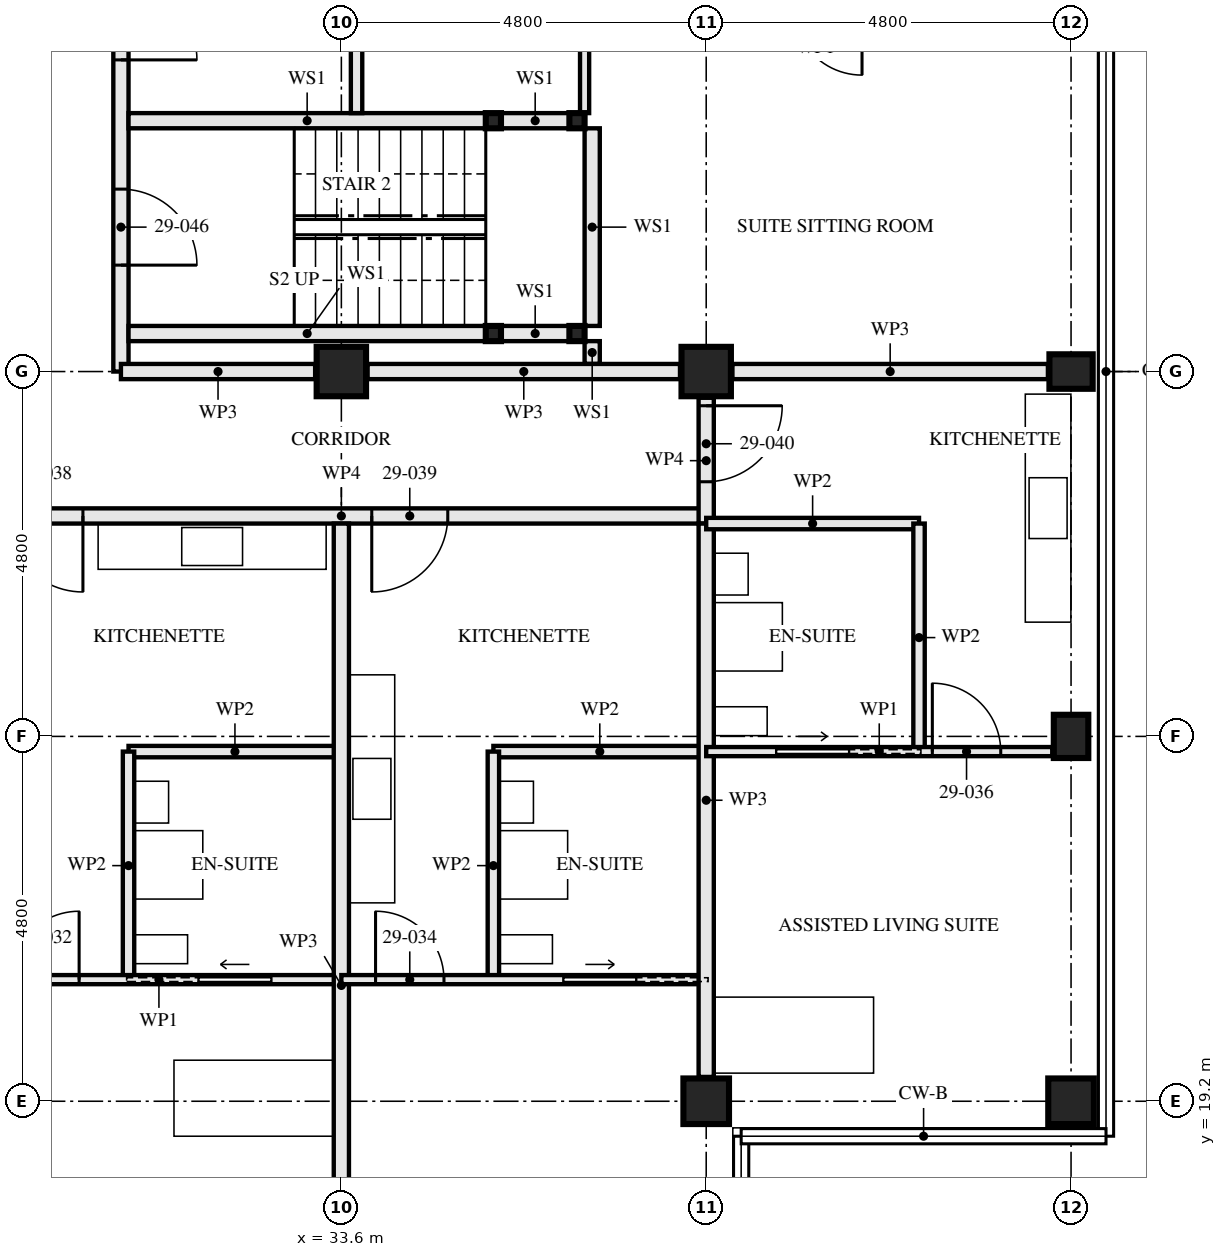
"""IFC4 building model, lengths in metres.
Left out: names, types, materials, properties, quantities, classifications, styles, units other than length and angle.
Written with IfcOpenShell. Run it as: python <this file> out.ifc"""

import sys

from ifc_helpers import new_model, si_unit, direction, frame, frame_2d, origin, origin_2d, place, context, subcontext, project, spatial, rectangle, hollow_rectangle, i_section, extrude, element, fill, save


model = new_model("IFC4")
c1 = context("Model", 3, precision=1e-05, world=origin(), true_north=direction((0.0, 1.0)))
c2 = subcontext(c1, "Body", "Model", "MODEL_VIEW")
j1 = project(units=[si_unit("LENGTHUNIT", "METRE"), si_unit("PLANEANGLEUNIT", "RADIAN")], contexts=[c1])
p1 = place(None, origin())
s1 = spatial("IfcSite", under=j1, at=p1, CompositionType="ELEMENT")
p2 = place(p1, origin())
s2 = spatial("IfcBuilding", under=s1, at=p2, CompositionType="ELEMENT")
p3 = place(p2, frame((0.0, 0.0, 108.5)))
s3 = spatial("IfcBuildingStorey", under=s2, at=p3, CompositionType="ELEMENT", Elevation=108.5)
p4 = place(p3, frame((33.6, 28.8, 0.0), z_axis=(0.0, 0.0, 1.0), x_axis=(0.0, 1.0, 0.0)))
e1 = element("IfcColumn", 1, at=p4, inside=s3, PredefinedType="COLUMN", context=c2, shape_type="SweptSolid", body=[
    extrude(hollow_rectangle(XDim=0.65, YDim=0.65, WallThickness=0.05, at=origin_2d()), origin(), (0.0, 0.0, 1.0), 3.5),
])
p5 = place(p3, frame((38.4, 19.2, 0.0), z_axis=(0.0, 0.0, 1.0), x_axis=(0.0, 1.0, 0.0)))
e2 = element("IfcColumn", 2, at=p5, inside=s3, PredefinedType="COLUMN", context=c2, shape_type="SweptSolid", body=[
    extrude(hollow_rectangle(XDim=0.6, YDim=0.6, WallThickness=0.05, at=origin_2d()), origin(), (0.0, 0.0, 1.0), 3.5),
])
p6 = place(p3, frame((38.4, 28.8, 0.0), z_axis=(0.0, 0.0, 1.0), x_axis=(0.0, 1.0, 0.0)))
e3 = element("IfcColumn", 3, at=p6, inside=s3, PredefinedType="COLUMN", context=c2, shape_type="SweptSolid", body=[
    extrude(hollow_rectangle(XDim=0.65, YDim=0.65, WallThickness=0.05, at=origin_2d()), origin(), (0.0, 0.0, 1.0), 3.5),
])
p7 = place(p3, frame((43.2, 19.2, 0.0), z_axis=(0.0, 0.0, 1.0), x_axis=(0.0, 1.0, 0.0)))
e4 = element("IfcColumn", 4, at=p7, inside=s3, PredefinedType="COLUMN", context=c2, shape_type="SweptSolid", body=[
    extrude(hollow_rectangle(XDim=0.6, YDim=0.6, WallThickness=0.05, at=origin_2d()), origin(), (0.0, 0.0, 1.0), 3.5),
])
for number, where, z_axis, x_axis in (
    (5, (43.2, 24.0, 0.0), (0.0, 0.0, 1.0), (1.0, 0.0, 0.0)),
    (6, (43.2, 28.8, 0.0), (0.0, 0.0, 1.0), (0.0, 1.0, 0.0)),
):
    element("IfcColumn", number, at=place(p3, frame(where, z_axis=z_axis, x_axis=x_axis)), inside=s3, PredefinedType="COLUMN", context=c2, shape_type="SweptSolid", body=[
        extrude(i_section(OverallWidth=0.454, OverallDepth=0.569, WebThickness=0.078, FlangeThickness=0.125, FilletRadius=0.015, at=origin_2d()), origin(), (0.0, 0.0, 1.0), 3.5),
    ])
for number, where, z_axis, x_axis in (
    (7, (36.7, 29.3, 0.0), (0.0, 0.0, 1.0), (1.0, 0.0, 0.0)),
    (8, (36.7, 32.1, 0.0), (0.0, 0.0, 1.0), (1.0, 0.0, 0.0)),
    (9, (35.6, 29.3, 0.0), (0.0, 0.0, 1.0), (1.0, 0.0, 0.0)),
    (10, (35.6, 32.1, 0.0), (0.0, 0.0, 1.0), (1.0, 0.0, 0.0)),
):
    element("IfcColumn", number, at=place(p3, frame(where, z_axis=z_axis, x_axis=x_axis)), inside=s3, PredefinedType="COLUMN", context=c2, shape_type="SweptSolid", body=[
        extrude(hollow_rectangle(XDim=0.2, YDim=0.2, WallThickness=0.008, at=origin_2d()), origin(), (0.0, 0.0, 1.0), 3.33),
    ])
p8 = place(p3, frame((30.8, 20.8, 0.0), z_axis=(0.0, 0.0, 1.0), x_axis=(0.0, 1.0, 0.0)))
e11 = element("IfcWall", 11, at=p8, inside=s3, PredefinedType="PARTITIONING", context=c2, shape_type="SweptSolid", body=[
    extrude(rectangle(XDim=3.0, YDim=0.15, at=frame_2d((1.5, 0.0))), origin(), (0.0, 0.0, 1.0), 3.33),
])
p9 = place(p3, frame((30.8, 23.8, 0.0), z_axis=(0.0, 0.0, 1.0), x_axis=(1.0, 0.0, 0.0)))
e12 = element("IfcWall", 12, at=p9, inside=s3, PredefinedType="PARTITIONING", context=c2, shape_type="SweptSolid", body=[
    extrude(rectangle(XDim=2.8, YDim=0.15, at=frame_2d((1.4, 0.0))), origin(), (0.0, 0.0, 1.0), 3.33),
])
p10 = place(p3, frame((28.8, 20.8, 0.0), z_axis=(0.0, 0.0, 1.0), x_axis=(1.0, 0.0, 0.0)))
e13 = element("IfcWall", 13, at=p10, inside=s3, PredefinedType="PARTITIONING", context=c2, shape_type="SweptSolid", body=[
    extrude(rectangle(XDim=4.8, YDim=0.12, at=frame_2d((2.4, 0.0))), origin(), (0.0, 0.0, 1.0), 3.33),
])
p11 = place(p10, frame((0.45, 0.0, 0.0)))
e14 = element("IfcOpeningElement", 14, at=p11, cuts=e13, PredefinedType="OPENING", context=c2, shape_type="SweptSolid", body=[
    extrude(rectangle(XDim=0.9, YDim=2.1, at=frame_2d((0.45, 1.05))), frame((0.0, 0.071, 0.0), z_axis=(0.0, -1.0, 0.0), x_axis=(1.0, 0.0, 0.0)), (0.0, 0.0, 1.0), 0.141),
])
p12 = place(p10, frame((2.925, 0.0, 0.0)))
e15 = element("IfcOpeningElement", 15, at=p12, cuts=e13, PredefinedType="OPENING", context=c2, shape_type="SweptSolid", body=[
    extrude(rectangle(XDim=0.95, YDim=2.1, at=frame_2d((0.475, 1.05))), frame((0.0, 0.071, 0.0), z_axis=(0.0, -1.0, 0.0), x_axis=(1.0, 0.0, 0.0)), (0.0, 0.0, 1.0), 0.141),
])
p13 = place(p3, frame((33.6, 14.647, 0.0), z_axis=(0.0, 0.0, 1.0), x_axis=(0.0, 1.0, 0.0)))
e16 = element("IfcWall", 16, at=p13, inside=s3, PredefinedType="PARTITIONING", context=c2, shape_type="SweptSolid", body=[
    extrude(rectangle(XDim=12.153, YDim=0.2, at=frame_2d((6.077, 0.0))), origin(), (0.0, 0.0, 1.0), 2.55),
])
p14 = place(p3, frame((35.6, 20.8, 0.0), z_axis=(0.0, 0.0, 1.0), x_axis=(0.0, 1.0, 0.0)))
e17 = element("IfcWall", 17, at=p14, inside=s3, PredefinedType="PARTITIONING", context=c2, shape_type="SweptSolid", body=[
    extrude(rectangle(XDim=3.0, YDim=0.15, at=frame_2d((1.5, 0.0))), origin(), (0.0, 0.0, 1.0), 3.33),
])
p15 = place(p3, frame((35.6, 23.8, 0.0), z_axis=(0.0, 0.0, 1.0), x_axis=(1.0, 0.0, 0.0)))
e18 = element("IfcWall", 18, at=p15, inside=s3, PredefinedType="PARTITIONING", context=c2, shape_type="SweptSolid", body=[
    extrude(rectangle(XDim=2.8, YDim=0.15, at=frame_2d((1.4, 0.0))), origin(), (0.0, 0.0, 1.0), 3.33),
])
p16 = place(p3, frame((33.6, 20.8, 0.0), z_axis=(0.0, 0.0, 1.0), x_axis=(1.0, 0.0, 0.0)))
e19 = element("IfcWall", 19, at=p16, inside=s3, PredefinedType="PARTITIONING", context=c2, shape_type="SweptSolid", body=[
    extrude(rectangle(XDim=4.8, YDim=0.12, at=frame_2d((2.4, 0.0))), origin(), (0.0, 0.0, 1.0), 3.33),
])
p17 = place(p16, frame((0.45, 0.0, 0.0)))
e20 = element("IfcOpeningElement", 20, at=p17, cuts=e19, PredefinedType="OPENING", context=c2, shape_type="SweptSolid", body=[
    extrude(rectangle(XDim=0.9, YDim=2.1, at=frame_2d((0.45, 1.05))), frame((0.0, 0.071, 0.0), z_axis=(0.0, -1.0, 0.0), x_axis=(1.0, 0.0, 0.0)), (0.0, 0.0, 1.0), 0.141),
])
p18 = place(p16, frame((2.925, 0.0, 0.0)))
e21 = element("IfcOpeningElement", 21, at=p18, cuts=e19, PredefinedType="OPENING", context=c2, shape_type="SweptSolid", body=[
    extrude(rectangle(XDim=0.95, YDim=2.1, at=frame_2d((0.475, 1.05))), frame((0.0, 0.071, 0.0), z_axis=(0.0, -1.0, 0.0), x_axis=(1.0, 0.0, 0.0)), (0.0, 0.0, 1.0), 0.141),
])
p19 = place(p3, frame((38.4, 19.52, 0.0), z_axis=(0.0, 0.0, 1.0), x_axis=(0.0, 1.0, 0.0)))
e22 = element("IfcWall", 22, at=p19, inside=s3, PredefinedType="PARTITIONING", context=c2, shape_type="SweptSolid", body=[
    extrude(rectangle(XDim=7.28, YDim=0.2, at=frame_2d((3.64, 0.0))), origin(), (0.0, 0.0, 1.0), 2.55),
])
p20 = place(p3, frame((41.2, 23.8, 0.0), z_axis=(0.0, 0.0, 1.0), x_axis=(0.0, 1.0, 0.0)))
e23 = element("IfcWall", 23, at=p20, inside=s3, PredefinedType="PARTITIONING", context=c2, shape_type="SweptSolid", body=[
    extrude(rectangle(XDim=3.0, YDim=0.15, at=frame_2d((1.5, 0.0))), origin(), (0.0, 0.0, 1.0), 2.55),
])
p21 = place(p3, frame((38.4, 26.8, 0.0), z_axis=(0.0, 0.0, 1.0), x_axis=(1.0, 0.0, 0.0)))
e24 = element("IfcWall", 24, at=p21, inside=s3, PredefinedType="PARTITIONING", context=c2, shape_type="SweptSolid", body=[
    extrude(rectangle(XDim=2.8, YDim=0.15, at=frame_2d((1.4, 0.0))), origin(), (0.0, 0.0, 1.0), 3.33),
])
p22 = place(p3, frame((38.4, 23.8, 0.0), z_axis=(0.0, 0.0, 1.0), x_axis=(1.0, 0.0, 0.0)))
e25 = element("IfcWall", 25, at=p22, inside=s3, PredefinedType="PARTITIONING", context=c2, shape_type="SweptSolid", body=[
    extrude(rectangle(XDim=4.553, YDim=0.12, at=frame_2d((2.276, 0.0))), origin(), (0.0, 0.0, 1.0), 3.33),
])
p23 = place(p22, frame((2.975, 0.0, 0.0)))
e26 = element("IfcOpeningElement", 26, at=p23, cuts=e25, PredefinedType="OPENING", context=c2, shape_type="SweptSolid", body=[
    extrude(rectangle(XDim=0.9, YDim=2.1, at=frame_2d((0.45, 1.05))), frame((0.0, 0.071, 0.0), z_axis=(0.0, -1.0, 0.0), x_axis=(1.0, 0.0, 0.0)), (0.0, 0.0, 1.0), 0.141),
])
p24 = place(p22, frame((0.925, 0.0, 0.0)))
e27 = element("IfcOpeningElement", 27, at=p24, cuts=e25, PredefinedType="OPENING", context=c2, shape_type="SweptSolid", body=[
    extrude(rectangle(XDim=0.95, YDim=2.1, at=frame_2d((0.475, 1.05))), frame((0.0, 0.071, 0.0), z_axis=(0.0, -1.0, 0.0), x_axis=(1.0, 0.0, 0.0)), (0.0, 0.0, 1.0), 0.141),
])
p25 = place(p3, frame((28.8, 26.9, 0.0), z_axis=(0.0, 0.0, 1.0), x_axis=(1.0, 0.0, 0.0)))
e28 = element("IfcWall", 28, at=p25, inside=s3, PredefinedType="PARTITIONING", context=c2, shape_type="SweptSolid", body=[
    extrude(rectangle(XDim=9.6, YDim=0.2, at=frame_2d((4.8, 0.0))), origin(), (0.0, 0.0, 1.0), 3.33),
])
p26 = place(p25, frame((0.4, 0.0, 0.0)))
e29 = element("IfcOpeningElement", 29, at=p26, cuts=e28, PredefinedType="OPENING", context=c2, shape_type="SweptSolid", body=[
    extrude(rectangle(XDim=1.0, YDim=2.1, at=frame_2d((0.5, 1.05))), frame((0.0, 0.111, 0.0), z_axis=(0.0, -1.0, 0.0), x_axis=(1.0, 0.0, 0.0)), (0.0, 0.0, 1.0), 0.221),
])
p27 = place(p25, frame((5.2, 0.0, 0.0)))
e30 = element("IfcOpeningElement", 30, at=p27, cuts=e28, PredefinedType="OPENING", context=c2, shape_type="SweptSolid", body=[
    extrude(rectangle(XDim=1.0, YDim=2.1, at=frame_2d((0.5, 1.05))), frame((0.0, 0.111, 0.0), z_axis=(0.0, -1.0, 0.0), x_axis=(1.0, 0.0, 0.0)), (0.0, 0.0, 1.0), 0.221),
])
p28 = place(p3, frame((38.4, 26.8, 0.0), z_axis=(0.0, 0.0, 1.0), x_axis=(0.0, 1.0, 0.0)))
e31 = element("IfcWall", 31, at=p28, inside=s3, PredefinedType="PARTITIONING", context=c2, shape_type="SweptSolid", body=[
    extrude(rectangle(XDim=1.655, YDim=0.2, at=frame_2d((0.828, 0.0))), origin(), (0.0, 0.0, 1.0), 3.33),
])
p29 = place(p28, frame((0.55, 0.0, 0.0)))
e32 = element("IfcOpeningElement", 32, at=p29, cuts=e31, PredefinedType="OPENING", context=c2, shape_type="SweptSolid", body=[
    extrude(rectangle(XDim=1.0, YDim=2.1, at=frame_2d((0.5, 1.05))), frame((0.0, 0.111, 0.0), z_axis=(0.0, -1.0, 0.0), x_axis=(1.0, 0.0, 0.0)), (0.0, 0.0, 1.0), 0.221),
])
p30 = place(p3, frame((36.6, 29.3, 0.0), z_axis=(0.0, 0.0, 1.0), x_axis=(-1.0, 0.0, 0.0)))
e33 = element("IfcWall", 33, at=p30, inside=s3, PredefinedType="SOLIDWALL", context=c2, shape_type="SweptSolid", body=[
    extrude(rectangle(XDim=0.9, YDim=0.2, at=frame_2d((0.45, 0.0))), origin(), (0.0, 0.0, 1.0), 2.99),
])
p31 = place(p3, frame((35.5, 29.3, 0.0), z_axis=(0.0, 0.0, 1.0), x_axis=(-1.0, 0.0, 0.0)))
e34 = element("IfcWall", 34, at=p31, inside=s3, PredefinedType="SOLIDWALL", context=c2, shape_type="SweptSolid", body=[
    extrude(rectangle(XDim=4.7, YDim=0.2, at=frame_2d((2.35, 0.0))), origin(), (0.0, 0.0, 1.0), 2.99),
])
p32 = place(p3, frame((36.6, 32.1, 0.0), z_axis=(0.0, 0.0, 1.0), x_axis=(-1.0, 0.0, 0.0)))
e35 = element("IfcWall", 35, at=p32, inside=s3, PredefinedType="SOLIDWALL", context=c2, shape_type="SweptSolid", body=[
    extrude(rectangle(XDim=0.9, YDim=0.2, at=frame_2d((0.45, 0.0))), origin(), (0.0, 0.0, 1.0), 2.99),
])
p33 = place(p3, frame((35.5, 32.1, 0.0), z_axis=(0.0, 0.0, 1.0), x_axis=(-1.0, 0.0, 0.0)))
e36 = element("IfcWall", 36, at=p33, inside=s3, PredefinedType="SOLIDWALL", context=c2, shape_type="SweptSolid", body=[
    extrude(rectangle(XDim=4.7, YDim=0.2, at=frame_2d((2.35, 0.0))), origin(), (0.0, 0.0, 1.0), 2.99),
])
p34 = place(p3, frame((36.9, 28.9, 0.0), z_axis=(0.0, 0.0, 1.0), x_axis=(0.0, 1.0, 0.0)))
e37 = element("IfcWall", 37, at=p34, inside=s3, PredefinedType="SOLIDWALL", context=c2, shape_type="SweptSolid", body=[
    extrude(rectangle(XDim=0.3, YDim=0.2, at=frame_2d((0.15, 0.0))), origin(), (0.0, 0.0, 1.0), 3.33),
])
p35 = place(p3, frame((36.9, 29.4, 0.0), z_axis=(0.0, 0.0, 1.0), x_axis=(0.0, 1.0, 0.0)))
e38 = element("IfcWall", 38, at=p35, inside=s3, PredefinedType="SOLIDWALL", context=c2, shape_type="SweptSolid", body=[
    extrude(rectangle(XDim=2.6, YDim=0.2, at=frame_2d((1.3, 0.0))), origin(), (0.0, 0.0, 1.0), 3.33),
])
p36 = place(p3, frame((33.8, 32.2, 0.0), z_axis=(0.0, 0.0, 1.0), x_axis=(0.0, 1.0, 0.0)))
e39 = element("IfcWall", 39, at=p36, inside=s3, PredefinedType="PARTITIONING", context=c2, shape_type="SweptSolid", body=[
    extrude(rectangle(XDim=2.4, YDim=0.15, at=frame_2d((1.2, 0.0))), origin(), (0.0, 0.0, 1.0), 2.55),
])
p37 = place(p3, frame((36.8, 32.2, 0.0), z_axis=(0.0, 0.0, 1.0), x_axis=(0.0, 1.0, 0.0)))
e40 = element("IfcWall", 40, at=p37, inside=s3, PredefinedType="PARTITIONING", context=c2, shape_type="SweptSolid", body=[
    extrude(rectangle(XDim=1.4, YDim=0.12, at=frame_2d((0.7, 0.0))), origin(), (0.0, 0.0, 1.0), 3.33),
])
p38 = place(p3, frame((30.7, 28.8, 0.0), z_axis=(0.0, 0.0, 1.0), x_axis=(0.0, 1.0, 0.0)))
e41 = element("IfcWall", 41, at=p38, inside=s3, PredefinedType="PARTITIONING", context=c2, shape_type="SweptSolid", body=[
    extrude(rectangle(XDim=14.84, YDim=0.2, at=frame_2d((7.42, 0.0))), origin(), (0.0, 0.0, 1.0), 2.32),
])
p39 = place(p38, frame((1.4, 0.0, 0.0)))
e42 = element("IfcOpeningElement", 42, at=p39, cuts=e41, PredefinedType="OPENING", context=c2, shape_type="SweptSolid", body=[
    extrude(rectangle(XDim=1.0, YDim=2.1, at=frame_2d((0.5, 1.05))), frame((0.0, 0.111, 0.0), z_axis=(0.0, -1.0, 0.0), x_axis=(1.0, 0.0, 0.0)), (0.0, 0.0, 1.0), 0.221),
])
p40 = place(p38, frame((4.1, 0.0, 0.0)))
e43 = element("IfcOpeningElement", 43, at=p40, cuts=e41, PredefinedType="OPENING", context=c2, shape_type="SweptSolid", body=[
    extrude(rectangle(XDim=1.0, YDim=2.1, at=frame_2d((0.5, 1.05))), frame((0.0, 0.111, 0.0), z_axis=(0.0, -1.0, 0.0), x_axis=(1.0, 0.0, 0.0)), (0.0, 0.0, 1.0), 0.221),
])
p41 = place(p38, frame((5.975, 0.0, 0.0)))
e44 = element("IfcOpeningElement", 44, at=p41, cuts=e41, PredefinedType="OPENING", context=c2, shape_type="SweptSolid", body=[
    extrude(rectangle(XDim=1.0, YDim=2.1, at=frame_2d((0.5, 1.05))), frame((0.0, 0.111, 0.0), z_axis=(0.0, -1.0, 0.0), x_axis=(1.0, 0.0, 0.0)), (0.0, 0.0, 1.0), 0.221),
])
p42 = place(p38, frame((13.0, 0.0, 0.0)))
e45 = element("IfcOpeningElement", 45, at=p42, cuts=e41, PredefinedType="OPENING", context=c2, shape_type="SweptSolid", body=[
    extrude(rectangle(XDim=1.0, YDim=2.1, at=frame_2d((0.5, 1.05))), frame((0.0, 0.111, 0.0), z_axis=(0.0, -1.0, 0.0), x_axis=(1.0, 0.0, 0.0)), (0.0, 0.0, 1.0), 0.221),
])
p43 = place(p3, frame((42.896, 28.8, 0.0), z_axis=(0.0, 0.0, 1.0), x_axis=(-1.0, 0.0, 0.0)))
e46 = element("IfcWall", 46, at=p43, inside=s3, PredefinedType="PARTITIONING", context=c2, shape_type="SweptSolid", body=[
    extrude(rectangle(XDim=4.15, YDim=0.2, at=frame_2d((2.075, 0.0))), origin(), (0.0, 0.0, 1.0), 2.32),
])
p44 = place(p3, frame((38.055, 28.8, 0.0), z_axis=(0.0, 0.0, 1.0), x_axis=(-1.0, 0.0, 0.0)))
e47 = element("IfcWall", 47, at=p44, inside=s3, PredefinedType="PARTITIONING", context=c2, shape_type="SweptSolid", body=[
    extrude(rectangle(XDim=4.11, YDim=0.2, at=frame_2d((2.055, 0.0))), origin(), (0.0, 0.0, 1.0), 2.32),
])
p45 = place(p3, frame((33.255, 28.8, 0.0), z_axis=(0.0, 0.0, 1.0), x_axis=(-1.0, 0.0, 0.0)))
e48 = element("IfcWall", 48, at=p45, inside=s3, PredefinedType="PARTITIONING", context=c2, shape_type="SweptSolid", body=[
    extrude(rectangle(XDim=2.555, YDim=0.2, at=frame_2d((1.277, 0.0))), origin(), (0.0, 0.0, 1.0), 2.32),
])
p46 = place(p11, origin())
e49 = element("IfcDoor", 49, at=p46, inside=s3, OperationType="SINGLE_SWING_LEFT", PredefinedType="DOOR", context=c2, shape_type="SweptSolid", body=[
    extrude(rectangle(XDim=0.9, YDim=2.1, at=frame_2d((0.45, 1.05))), frame((0.0, 0.022, 0.0), z_axis=(0.0, -1.0, 0.0), x_axis=(1.0, 0.0, 0.0)), (0.0, 0.0, 1.0), 0.044),
])
fill(e14, e49)
p47 = place(p12, origin())
e50 = element("IfcDoor", 50, at=p47, inside=s3, OperationType="SLIDING_TO_RIGHT", PredefinedType="DOOR", context=c2, shape_type="SweptSolid", body=[
    extrude(rectangle(XDim=0.95, YDim=2.1, at=frame_2d((0.475, 1.05))), frame((0.0, 0.022, 0.0), z_axis=(0.0, -1.0, 0.0), x_axis=(1.0, 0.0, 0.0)), (0.0, 0.0, 1.0), 0.044),
])
fill(e15, e50)
p48 = place(p17, origin())
e51 = element("IfcDoor", 51, at=p48, inside=s3, OperationType="SINGLE_SWING_RIGHT", PredefinedType="DOOR", context=c2, shape_type="SweptSolid", body=[
    extrude(rectangle(XDim=0.9, YDim=2.1, at=frame_2d((0.45, 1.05))), frame((0.0, 0.022, 0.0), z_axis=(0.0, -1.0, 0.0), x_axis=(1.0, 0.0, 0.0)), (0.0, 0.0, 1.0), 0.044),
])
fill(e20, e51)
p49 = place(p18, origin())
e52 = element("IfcDoor", 52, at=p49, inside=s3, OperationType="SLIDING_TO_LEFT", PredefinedType="DOOR", context=c2, shape_type="SweptSolid", body=[
    extrude(rectangle(XDim=0.95, YDim=2.1, at=frame_2d((0.475, 1.05))), frame((0.0, 0.022, 0.0), z_axis=(0.0, -1.0, 0.0), x_axis=(1.0, 0.0, 0.0)), (0.0, 0.0, 1.0), 0.044),
])
fill(e21, e52)
p50 = place(p23, origin())
e53 = element("IfcDoor", 53, at=p50, inside=s3, OperationType="SINGLE_SWING_RIGHT", PredefinedType="DOOR", context=c2, shape_type="SweptSolid", body=[
    extrude(rectangle(XDim=0.9, YDim=2.1, at=frame_2d((0.45, 1.05))), frame((0.0, 0.022, 0.0), z_axis=(0.0, -1.0, 0.0), x_axis=(1.0, 0.0, 0.0)), (0.0, 0.0, 1.0), 0.044),
])
fill(e26, e53)
p51 = place(p24, origin())
e54 = element("IfcDoor", 54, at=p51, inside=s3, OperationType="SLIDING_TO_LEFT", PredefinedType="DOOR", context=c2, shape_type="SweptSolid", body=[
    extrude(rectangle(XDim=0.95, YDim=2.1, at=frame_2d((0.475, 1.05))), frame((0.0, 0.022, 0.0), z_axis=(0.0, -1.0, 0.0), x_axis=(1.0, 0.0, 0.0)), (0.0, 0.0, 1.0), 0.044),
])
fill(e27, e54)
p52 = place(p26, frame((1.0, 0.0, 0.0), z_axis=(0.0, 0.0, 1.0), x_axis=(-1.0, 0.0, 0.0)))
e55 = element("IfcDoor", 55, at=p52, inside=s3, OperationType="SINGLE_SWING_RIGHT", PredefinedType="DOOR", context=c2, shape_type="SweptSolid", body=[
    extrude(rectangle(XDim=1.0, YDim=2.1, at=frame_2d((0.5, 1.05))), frame((0.0, 0.027, 0.0), z_axis=(0.0, -1.0, 0.0), x_axis=(1.0, 0.0, 0.0)), (0.0, 0.0, 1.0), 0.054),
])
fill(e29, e55)
p53 = place(p27, frame((1.0, 0.0, 0.0), z_axis=(0.0, 0.0, 1.0), x_axis=(-1.0, 0.0, 0.0)))
e56 = element("IfcDoor", 56, at=p53, inside=s3, OperationType="SINGLE_SWING_LEFT", PredefinedType="DOOR", context=c2, shape_type="SweptSolid", body=[
    extrude(rectangle(XDim=1.0, YDim=2.1, at=frame_2d((0.5, 1.05))), frame((0.0, 0.027, 0.0), z_axis=(0.0, -1.0, 0.0), x_axis=(1.0, 0.0, 0.0)), (0.0, 0.0, 1.0), 0.054),
])
fill(e30, e56)
p54 = place(p29, frame((1.0, 0.0, 0.0), z_axis=(0.0, 0.0, 1.0), x_axis=(-1.0, 0.0, 0.0)))
e57 = element("IfcDoor", 57, at=p54, inside=s3, OperationType="SINGLE_SWING_RIGHT", PredefinedType="DOOR", context=c2, shape_type="SweptSolid", body=[
    extrude(rectangle(XDim=1.0, YDim=2.1, at=frame_2d((0.5, 1.05))), frame((0.0, 0.027, 0.0), z_axis=(0.0, -1.0, 0.0), x_axis=(1.0, 0.0, 0.0)), (0.0, 0.0, 1.0), 0.054),
])
fill(e32, e57)
p55 = place(p39, frame((1.0, 0.0, 0.0), z_axis=(0.0, 0.0, 1.0), x_axis=(-1.0, 0.0, 0.0)))
e58 = element("IfcDoor", 58, at=p55, inside=s3, OperationType="SINGLE_SWING_LEFT", PredefinedType="DOOR", context=c2, shape_type="SweptSolid", body=[
    extrude(rectangle(XDim=1.0, YDim=2.1, at=frame_2d((0.5, 1.05))), frame((0.0, 0.032, 0.0), z_axis=(0.0, -1.0, 0.0), x_axis=(1.0, 0.0, 0.0)), (0.0, 0.0, 1.0), 0.064),
])
fill(e42, e58)
p56 = place(p40, frame((1.0, 0.0, 0.0), z_axis=(0.0, 0.0, 1.0), x_axis=(-1.0, 0.0, 0.0)))
e59 = element("IfcDoor", 59, at=p56, inside=s3, OperationType="SINGLE_SWING_LEFT", PredefinedType="DOOR", context=c2, shape_type="SweptSolid", body=[
    extrude(rectangle(XDim=1.0, YDim=2.1, at=frame_2d((0.5, 1.05))), frame((0.0, 0.027, 0.0), z_axis=(0.0, -1.0, 0.0), x_axis=(1.0, 0.0, 0.0)), (0.0, 0.0, 1.0), 0.054),
])
fill(e43, e59)
save(model, sys.argv[1])
